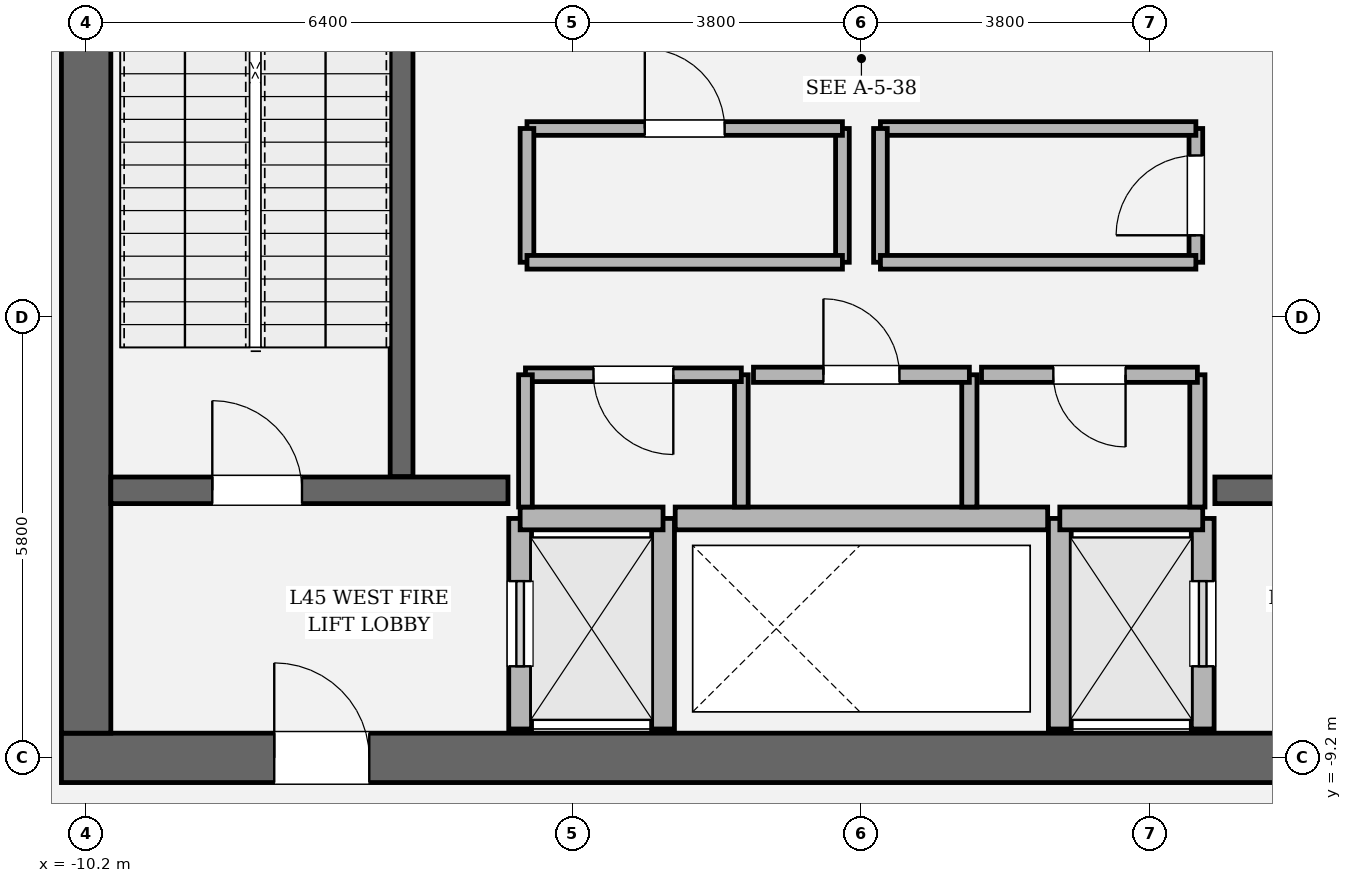
"""IFC4 building model, lengths in metres.
Left out: names, types, materials, properties, quantities, classifications, styles, units other than length and angle.
Written with IfcOpenShell. Run it as: python <this file> out.ifc"""

import sys

from ifc_helpers import new_model, si_unit, direction, frame, frame_2d, origin, place, context, subcontext, project, spatial, rectangle, extrude, element, fill, save


model = new_model("IFC4")
c1 = context("Model", 3, precision=1e-05, world=origin(), true_north=direction((0.0, 1.0)))
c2 = subcontext(c1, "Body", "Model", "MODEL_VIEW")
j1 = project(units=[si_unit("LENGTHUNIT", "METRE"), si_unit("PLANEANGLEUNIT", "RADIAN")], contexts=[c1])
p1 = place(None, origin())
s1 = spatial("IfcSite", under=j1, at=p1, CompositionType="ELEMENT")
p2 = place(p1, origin())
s2 = spatial("IfcBuilding", under=s1, at=p2, CompositionType="ELEMENT")
p3 = place(p2, frame((0.0, 0.0, 192.45)))
s3 = spatial("IfcBuildingStorey", under=s2, at=p3, CompositionType="ELEMENT", Elevation=192.45)
p4 = place(p3, frame((10.525, -9.2, 0.0), z_axis=(0.0, 0.0, 1.0), x_axis=(-1.0, 0.0, 0.0)))
e1 = element("IfcWall", 1, at=p4, inside=s3, PredefinedType="SHEAR", context=c2, shape_type="SweptSolid", body=[
    extrude(rectangle(XDim=21.05, YDim=0.65, at=frame_2d((10.525, 0.0))), origin(), (0.0, 0.0, 1.0), 4.05),
])
p5 = place(p4, frame((2.8, 0.0, 0.0)))
e2 = element("IfcOpeningElement", 2, at=p5, cuts=e1, PredefinedType="OPENING", context=c2, shape_type="SweptSolid", body=[
    extrude(rectangle(XDim=1.25, YDim=2.25, at=frame_2d((0.625, 1.125))), frame((0.0, 0.335, 0.0), z_axis=(0.0, -1.0, 0.0), x_axis=(1.0, 0.0, 0.0)), (0.0, 0.0, 1.0), 0.67),
])
p6 = place(p4, frame((17.0, 0.0, 0.0)))
e3 = element("IfcOpeningElement", 3, at=p6, cuts=e1, PredefinedType="OPENING", context=c2, shape_type="SweptSolid", body=[
    extrude(rectangle(XDim=1.25, YDim=2.25, at=frame_2d((0.625, 1.125))), frame((0.0, 0.335, 0.0), z_axis=(0.0, -1.0, 0.0), x_axis=(1.0, 0.0, 0.0)), (0.0, 0.0, 1.0), 0.67),
])
p7 = place(p3, frame((-10.2, -8.875, 0.0), z_axis=(0.0, 0.0, 1.0), x_axis=(0.0, 1.0, 0.0)))
e4 = element("IfcWall", 4, at=p7, inside=s3, PredefinedType="SHEAR", context=c2, shape_type="SweptSolid", body=[
    extrude(rectangle(XDim=17.75, YDim=0.65, at=frame_2d((8.875, 0.0))), origin(), (0.0, 0.0, 1.0), 4.05),
])
p8 = place(p7, frame((12.665, 0.0, 0.0)))
e5 = element("IfcOpeningElement", 5, at=p8, cuts=e4, PredefinedType="OPENING", context=c2, shape_type="SweptSolid", body=[
    extrude(rectangle(XDim=1.18, YDim=2.2, at=frame_2d((0.59, 1.1))), frame((0.0, 0.335, 0.0), z_axis=(0.0, -1.0, 0.0), x_axis=(1.0, 0.0, 0.0)), (0.0, 0.0, 1.0), 0.67),
])
p9 = place(p3, frame((-6.05, -5.5, 0.0), z_axis=(0.0, 0.0, 1.0), x_axis=(0.0, 1.0, 0.0)))
e6 = element("IfcWall", 6, at=p9, inside=s3, PredefinedType="SOLIDWALL", context=c2, shape_type="SweptSolid", body=[
    extrude(rectangle(XDim=8.95, YDim=0.3, at=frame_2d((4.475, 0.0))), origin(), (0.0, 0.0, 1.0), 4.05),
])
p10 = place(p3, frame((-9.875, -5.68, 0.0), z_axis=(0.0, 0.0, 1.0), x_axis=(1.0, 0.0, 0.0)))
e7 = element("IfcWall", 7, at=p10, inside=s3, PredefinedType="SOLIDWALL", context=c2, shape_type="SweptSolid", body=[
    extrude(rectangle(XDim=5.225, YDim=0.35, at=frame_2d((2.613, 0.0))), origin(), (0.0, 0.0, 1.0), 4.05),
])
p11 = place(p10, frame((1.335, 0.0, 0.0)))
e8 = element("IfcOpeningElement", 8, at=p11, cuts=e7, PredefinedType="OPENING", context=c2, shape_type="SweptSolid", body=[
    extrude(rectangle(XDim=1.18, YDim=2.2, at=frame_2d((0.59, 1.1))), frame((0.0, 0.185, 0.0), z_axis=(0.0, -1.0, 0.0), x_axis=(1.0, 0.0, 0.0)), (0.0, 0.0, 1.0), 0.37),
])
p12 = place(p3, frame((4.65, -5.68, 0.0), z_axis=(0.0, 0.0, 1.0), x_axis=(1.0, 0.0, 0.0)))
e9 = element("IfcWall", 9, at=p12, inside=s3, PredefinedType="SOLIDWALL", context=c2, shape_type="SweptSolid", body=[
    extrude(rectangle(XDim=5.225, YDim=0.35, at=frame_2d((2.613, 0.0))), origin(), (0.0, 0.0, 1.0), 4.05),
])
p13 = place(p12, frame((2.71, 0.0, 0.0)))
e10 = element("IfcOpeningElement", 10, at=p13, cuts=e9, PredefinedType="OPENING", context=c2, shape_type="SweptSolid", body=[
    extrude(rectangle(XDim=1.18, YDim=2.2, at=frame_2d((0.59, 1.1))), frame((0.0, 0.185, 0.0), z_axis=(0.0, -1.0, 0.0), x_axis=(1.0, 0.0, 0.0)), (0.0, 0.0, 1.0), 0.37),
])
p14 = place(p3, frame((-4.49, -8.82, 0.0), z_axis=(0.0, 0.0, 1.0), x_axis=(0.0, 1.0, 0.0)))
e11 = element("IfcWall", 11, at=p14, inside=s3, PredefinedType="SOLIDWALL", context=c2, shape_type="SweptSolid", body=[
    extrude(rectangle(XDim=2.77, YDim=0.3, at=frame_2d((1.385, 0.0))), origin(), (0.0, 0.0, 1.0), 3.83),
])
p15 = place(p14, frame((0.825, 0.0, 0.0)))
e12 = element("IfcOpeningElement", 12, at=p15, cuts=e11, PredefinedType="OPENING", context=c2, shape_type="SweptSolid", body=[
    extrude(rectangle(XDim=1.12, YDim=2.25, at=frame_2d((0.56, 1.125))), frame((0.0, 0.16, 0.0), z_axis=(0.0, -1.0, 0.0), x_axis=(1.0, 0.0, 0.0)), (0.0, 0.0, 1.0), 0.32),
])
p16 = place(p3, frame((-2.61, -8.82, 0.0), z_axis=(0.0, 0.0, 1.0), x_axis=(0.0, 1.0, 0.0)))
e13 = element("IfcWall", 13, at=p16, inside=s3, PredefinedType="SOLIDWALL", context=c2, shape_type="SweptSolid", body=[
    extrude(rectangle(XDim=2.77, YDim=0.3, at=frame_2d((1.385, 0.0))), origin(), (0.0, 0.0, 1.0), 3.83),
])
p17 = place(p3, frame((-4.49, -6.05, 0.0), z_axis=(0.0, 0.0, 1.0), x_axis=(1.0, 0.0, 0.0)))
e14 = element("IfcWall", 14, at=p17, inside=s3, PredefinedType="SOLIDWALL", context=c2, shape_type="SweptSolid", body=[
    extrude(rectangle(XDim=1.88, YDim=0.3, at=frame_2d((0.94, 0.0))), origin(), (0.0, 0.0, 1.0), 3.83),
])
p18 = place(p3, frame((4.49, -8.82, 0.0), z_axis=(0.0, 0.0, 1.0), x_axis=(0.0, 1.0, 0.0)))
e15 = element("IfcWall", 15, at=p18, inside=s3, PredefinedType="SOLIDWALL", context=c2, shape_type="SweptSolid", body=[
    extrude(rectangle(XDim=2.77, YDim=0.3, at=frame_2d((1.385, 0.0))), origin(), (0.0, 0.0, 1.0), 3.83),
])
p19 = place(p18, frame((0.825, 0.0, 0.0)))
e16 = element("IfcOpeningElement", 16, at=p19, cuts=e15, PredefinedType="OPENING", context=c2, shape_type="SweptSolid", body=[
    extrude(rectangle(XDim=1.12, YDim=2.25, at=frame_2d((0.56, 1.125))), frame((0.0, 0.16, 0.0), z_axis=(0.0, -1.0, 0.0), x_axis=(1.0, 0.0, 0.0)), (0.0, 0.0, 1.0), 0.32),
])
p20 = place(p3, frame((2.61, -8.82, 0.0), z_axis=(0.0, 0.0, 1.0), x_axis=(0.0, 1.0, 0.0)))
e17 = element("IfcWall", 17, at=p20, inside=s3, PredefinedType="SOLIDWALL", context=c2, shape_type="SweptSolid", body=[
    extrude(rectangle(XDim=2.77, YDim=0.3, at=frame_2d((1.385, 0.0))), origin(), (0.0, 0.0, 1.0), 3.83),
])
p21 = place(p3, frame((2.61, -6.05, 0.0), z_axis=(0.0, 0.0, 1.0), x_axis=(1.0, 0.0, 0.0)))
e18 = element("IfcWall", 18, at=p21, inside=s3, PredefinedType="SOLIDWALL", context=c2, shape_type="SweptSolid", body=[
    extrude(rectangle(XDim=1.88, YDim=0.3, at=frame_2d((0.94, 0.0))), origin(), (0.0, 0.0, 1.0), 3.83),
])
p22 = place(p3, frame((-2.45, -6.05, 0.0), z_axis=(0.0, 0.0, 1.0), x_axis=(1.0, 0.0, 0.0)))
e19 = element("IfcWall", 19, at=p22, inside=s3, PredefinedType="SOLIDWALL", context=c2, shape_type="SweptSolid", body=[
    extrude(rectangle(XDim=4.9, YDim=0.3, at=frame_2d((2.45, 0.0))), origin(), (0.0, 0.0, 1.0), 3.83),
])
p23 = place(p3, frame((-1.58, -5.9, 0.0), z_axis=(0.0, 0.0, 1.0), x_axis=(0.0, 1.0, 0.0)))
e20 = element("IfcWall", 20, at=p23, inside=s3, PredefinedType="PARTITIONING", context=c2, shape_type="SweptSolid", body=[
    extrude(rectangle(XDim=1.74, YDim=0.18, at=frame_2d((0.87, 0.0))), origin(), (0.0, 0.0, 1.0), 3.83),
])
p24 = place(p3, frame((-1.58, -4.16, 0.0), z_axis=(0.0, 0.0, 1.0), x_axis=(-1.0, 0.0, 0.0)))
e21 = element("IfcWall", 21, at=p24, inside=s3, PredefinedType="PARTITIONING", context=c2, shape_type="SweptSolid", body=[
    extrude(rectangle(XDim=2.84, YDim=0.18, at=frame_2d((1.42, 0.0))), origin(), (0.0, 0.0, 1.0), 3.83),
])
p25 = place(p24, frame((0.895, 0.0, 0.0)))
e22 = element("IfcOpeningElement", 22, at=p25, cuts=e21, PredefinedType="OPENING", context=c2, shape_type="SweptSolid", body=[
    extrude(rectangle(XDim=1.05, YDim=2.2, at=frame_2d((0.525, 1.1))), frame((0.0, 0.1, 0.0), z_axis=(0.0, -1.0, 0.0), x_axis=(1.0, 0.0, 0.0)), (0.0, 0.0, 1.0), 0.2),
])
p26 = place(p3, frame((-4.42, -4.16, 0.0), z_axis=(0.0, 0.0, 1.0), x_axis=(0.0, -1.0, 0.0)))
e23 = element("IfcWall", 23, at=p26, inside=s3, PredefinedType="PARTITIONING", context=c2, shape_type="SweptSolid", body=[
    extrude(rectangle(XDim=1.74, YDim=0.18, at=frame_2d((0.87, 0.0))), origin(), (0.0, 0.0, 1.0), 3.83),
])
p27 = place(p3, frame((1.42, -5.9, 0.0), z_axis=(0.0, 0.0, 1.0), x_axis=(0.0, 1.0, 0.0)))
e24 = element("IfcWall", 24, at=p27, inside=s3, PredefinedType="SOLIDWALL", context=c2, shape_type="SweptSolid", body=[
    extrude(rectangle(XDim=1.74, YDim=0.2, at=frame_2d((0.87, 0.0))), origin(), (0.0, 0.0, 1.0), 3.83),
])
p28 = place(p3, frame((1.42, -4.16, 0.0), z_axis=(0.0, 0.0, 1.0), x_axis=(-1.0, 0.0, 0.0)))
e25 = element("IfcWall", 25, at=p28, inside=s3, PredefinedType="SOLIDWALL", context=c2, shape_type="SweptSolid", body=[
    extrude(rectangle(XDim=2.84, YDim=0.2, at=frame_2d((1.42, 0.0))), origin(), (0.0, 0.0, 1.0), 3.83),
])
p29 = place(p28, frame((0.92, 0.0, 0.0)))
e26 = element("IfcOpeningElement", 26, at=p29, cuts=e25, PredefinedType="OPENING", context=c2, shape_type="SweptSolid", body=[
    extrude(rectangle(XDim=1.0, YDim=2.15, at=frame_2d((0.5, 1.075))), frame((0.0, 0.11, 0.0), z_axis=(0.0, -1.0, 0.0), x_axis=(1.0, 0.0, 0.0)), (0.0, 0.0, 1.0), 0.22),
])
p30 = place(p3, frame((4.42, -5.9, 0.0), z_axis=(0.0, 0.0, 1.0), x_axis=(0.0, 1.0, 0.0)))
e27 = element("IfcWall", 27, at=p30, inside=s3, PredefinedType="SOLIDWALL", context=c2, shape_type="SweptSolid", body=[
    extrude(rectangle(XDim=1.74, YDim=0.2, at=frame_2d((0.87, 0.0))), origin(), (0.0, 0.0, 1.0), 3.83),
])
p31 = place(p3, frame((4.42, -4.16, 0.0), z_axis=(0.0, 0.0, 1.0), x_axis=(-1.0, 0.0, 0.0)))
e28 = element("IfcWall", 28, at=p31, inside=s3, PredefinedType="SOLIDWALL", context=c2, shape_type="SweptSolid", body=[
    extrude(rectangle(XDim=2.84, YDim=0.2, at=frame_2d((1.42, 0.0))), origin(), (0.0, 0.0, 1.0), 3.83),
])
p32 = place(p31, frame((0.945, 0.0, 0.0)))
e29 = element("IfcOpeningElement", 29, at=p32, cuts=e28, PredefinedType="OPENING", context=c2, shape_type="SweptSolid", body=[
    extrude(rectangle(XDim=0.95, YDim=2.15, at=frame_2d((0.475, 1.075))), frame((0.0, 0.11, 0.0), z_axis=(0.0, -1.0, 0.0), x_axis=(1.0, 0.0, 0.0)), (0.0, 0.0, 1.0), 0.22),
])
p33 = place(p3, frame((-0.25, -2.68, 0.0), z_axis=(0.0, 0.0, 1.0), x_axis=(0.0, 1.0, 0.0)))
e30 = element("IfcWall", 30, at=p33, inside=s3, PredefinedType="PARTITIONING", context=c2, shape_type="SweptSolid", body=[
    extrude(rectangle(XDim=1.76, YDim=0.18, at=frame_2d((0.88, 0.0))), origin(), (0.0, 0.0, 1.0), 3.83),
])
p34 = place(p3, frame((-0.25, -0.92, 0.0), z_axis=(0.0, 0.0, 1.0), x_axis=(-1.0, 0.0, 0.0)))
e31 = element("IfcWall", 31, at=p34, inside=s3, PredefinedType="PARTITIONING", context=c2, shape_type="SweptSolid", body=[
    extrude(rectangle(XDim=4.15, YDim=0.18, at=frame_2d((2.075, 0.0))), origin(), (0.0, 0.0, 1.0), 3.83),
])
p35 = place(p34, frame((1.55, 0.0, 0.0)))
e32 = element("IfcOpeningElement", 32, at=p35, cuts=e31, PredefinedType="OPENING", context=c2, shape_type="SweptSolid", body=[
    extrude(rectangle(XDim=1.05, YDim=2.2, at=frame_2d((0.525, 1.1))), frame((0.0, 0.1, 0.0), z_axis=(0.0, -1.0, 0.0), x_axis=(1.0, 0.0, 0.0)), (0.0, 0.0, 1.0), 0.2),
])
p36 = place(p3, frame((-4.4, -0.92, 0.0), z_axis=(0.0, 0.0, 1.0), x_axis=(0.0, -1.0, 0.0)))
e33 = element("IfcWall", 33, at=p36, inside=s3, PredefinedType="PARTITIONING", context=c2, shape_type="SweptSolid", body=[
    extrude(rectangle(XDim=1.76, YDim=0.18, at=frame_2d((0.88, 0.0))), origin(), (0.0, 0.0, 1.0), 3.83),
])
p37 = place(p3, frame((-4.4, -2.68, 0.0), z_axis=(0.0, 0.0, 1.0), x_axis=(1.0, 0.0, 0.0)))
e34 = element("IfcWall", 34, at=p37, inside=s3, PredefinedType="PARTITIONING", context=c2, shape_type="SweptSolid", body=[
    extrude(rectangle(XDim=4.15, YDim=0.18, at=frame_2d((2.075, 0.0))), origin(), (0.0, 0.0, 1.0), 3.83),
])
p38 = place(p3, frame((4.4, -2.68, 0.0), z_axis=(0.0, 0.0, 1.0), x_axis=(0.0, 1.0, 0.0)))
e35 = element("IfcWall", 35, at=p38, inside=s3, PredefinedType="PARTITIONING", context=c2, shape_type="SweptSolid", body=[
    extrude(rectangle(XDim=1.76, YDim=0.18, at=frame_2d((0.88, 0.0))), origin(), (0.0, 0.0, 1.0), 3.83),
])
p39 = place(p38, frame((0.355, 0.0, 0.0)))
e36 = element("IfcOpeningElement", 36, at=p39, cuts=e35, PredefinedType="OPENING", context=c2, shape_type="SweptSolid", body=[
    extrude(rectangle(XDim=1.05, YDim=2.2, at=frame_2d((0.525, 1.1))), frame((0.0, 0.1, 0.0), z_axis=(0.0, -1.0, 0.0), x_axis=(1.0, 0.0, 0.0)), (0.0, 0.0, 1.0), 0.2),
])
p40 = place(p3, frame((4.4, -0.92, 0.0), z_axis=(0.0, 0.0, 1.0), x_axis=(-1.0, 0.0, 0.0)))
e37 = element("IfcWall", 37, at=p40, inside=s3, PredefinedType="PARTITIONING", context=c2, shape_type="SweptSolid", body=[
    extrude(rectangle(XDim=4.15, YDim=0.18, at=frame_2d((2.075, 0.0))), origin(), (0.0, 0.0, 1.0), 3.83),
])
p41 = place(p3, frame((0.25, -0.92, 0.0), z_axis=(0.0, 0.0, 1.0), x_axis=(0.0, -1.0, 0.0)))
e38 = element("IfcWall", 38, at=p41, inside=s3, PredefinedType="PARTITIONING", context=c2, shape_type="SweptSolid", body=[
    extrude(rectangle(XDim=1.76, YDim=0.18, at=frame_2d((0.88, 0.0))), origin(), (0.0, 0.0, 1.0), 3.83),
])
p42 = place(p3, frame((0.25, -2.68, 0.0), z_axis=(0.0, 0.0, 1.0), x_axis=(1.0, 0.0, 0.0)))
e39 = element("IfcWall", 39, at=p42, inside=s3, PredefinedType="PARTITIONING", context=c2, shape_type="SweptSolid", body=[
    extrude(rectangle(XDim=4.15, YDim=0.18, at=frame_2d((2.075, 0.0))), origin(), (0.0, 0.0, 1.0), 3.83),
])
p43 = place(p11, origin())
e40 = element("IfcDoor", 40, at=p43, inside=s3, OperationType="SINGLE_SWING_LEFT", PredefinedType="DOOR", context=c2, shape_type="SweptSolid", body=[
    extrude(rectangle(XDim=1.18, YDim=2.2, at=frame_2d((0.59, 1.1))), frame((0.0, 0.025, 0.0), z_axis=(0.0, -1.0, 0.0), x_axis=(1.0, 0.0, 0.0)), (0.0, 0.0, 1.0), 0.05),
])
fill(e8, e40)
p44 = place(p6, origin())
e41 = element("IfcDoor", 41, at=p44, inside=s3, OperationType="SINGLE_SWING_RIGHT", PredefinedType="DOOR", context=c2, shape_type="SweptSolid", body=[
    extrude(rectangle(XDim=1.25, YDim=2.25, at=frame_2d((0.625, 1.125))), frame((0.0, 0.025, 0.0), z_axis=(0.0, -1.0, 0.0), x_axis=(1.0, 0.0, 0.0)), (0.0, 0.0, 1.0), 0.05),
])
fill(e3, e41)
p45 = place(p15, origin())
e42 = element("IfcDoor", 42, at=p45, inside=s3, OperationType="SLIDING_TO_LEFT", PredefinedType="DOOR", context=c2, shape_type="SweptSolid", body=[
    extrude(rectangle(XDim=1.12, YDim=2.25, at=frame_2d((0.56, 1.125))), frame((0.0, 0.025, 0.0), z_axis=(0.0, -1.0, 0.0), x_axis=(1.0, 0.0, 0.0)), (0.0, 0.0, 1.0), 0.05),
])
fill(e12, e42)
p46 = place(p19, origin())
e43 = element("IfcDoor", 43, at=p46, inside=s3, OperationType="SLIDING_TO_RIGHT", PredefinedType="DOOR", context=c2, shape_type="SweptSolid", body=[
    extrude(rectangle(XDim=1.12, YDim=2.25, at=frame_2d((0.56, 1.125))), frame((0.0, 0.025, 0.0), z_axis=(0.0, -1.0, 0.0), x_axis=(1.0, 0.0, 0.0)), (0.0, 0.0, 1.0), 0.05),
])
fill(e16, e43)
p47 = place(p25, origin())
e44 = element("IfcDoor", 44, at=p47, inside=s3, OperationType="SINGLE_SWING_LEFT", PredefinedType="DOOR", context=c2, shape_type="SweptSolid", body=[
    extrude(rectangle(XDim=1.05, YDim=2.2, at=frame_2d((0.525, 1.1))), frame((0.0, 0.025, 0.0), z_axis=(0.0, -1.0, 0.0), x_axis=(1.0, 0.0, 0.0)), (0.0, 0.0, 1.0), 0.05),
])
fill(e22, e44)
p48 = place(p29, origin())
e45 = element("IfcDoor", 45, at=p48, inside=s3, OperationType="SINGLE_SWING_RIGHT", PredefinedType="DOOR", context=c2, shape_type="SweptSolid", body=[
    extrude(rectangle(XDim=1.0, YDim=2.15, at=frame_2d((0.5, 1.075))), frame((0.0, 0.025, 0.0), z_axis=(0.0, -1.0, 0.0), x_axis=(1.0, 0.0, 0.0)), (0.0, 0.0, 1.0), 0.05),
])
fill(e26, e45)
p49 = place(p32, origin())
e46 = element("IfcDoor", 46, at=p49, inside=s3, OperationType="SINGLE_SWING_LEFT", PredefinedType="DOOR", context=c2, shape_type="SweptSolid", body=[
    extrude(rectangle(XDim=0.95, YDim=2.15, at=frame_2d((0.475, 1.075))), frame((0.0, 0.025, 0.0), z_axis=(0.0, -1.0, 0.0), x_axis=(1.0, 0.0, 0.0)), (0.0, 0.0, 1.0), 0.05),
])
fill(e29, e46)
p50 = place(p35, origin())
e47 = element("IfcDoor", 47, at=p50, inside=s3, OperationType="SINGLE_SWING_RIGHT", PredefinedType="DOOR", context=c2, shape_type="SweptSolid", body=[
    extrude(rectangle(XDim=1.05, YDim=2.2, at=frame_2d((0.525, 1.1))), frame((0.0, 0.025, 0.0), z_axis=(0.0, -1.0, 0.0), x_axis=(1.0, 0.0, 0.0)), (0.0, 0.0, 1.0), 0.05),
])
fill(e32, e47)
p51 = place(p39, origin())
e48 = element("IfcDoor", 48, at=p51, inside=s3, OperationType="SINGLE_SWING_LEFT", PredefinedType="DOOR", context=c2, shape_type="SweptSolid", body=[
    extrude(rectangle(XDim=1.05, YDim=2.2, at=frame_2d((0.525, 1.1))), frame((0.0, 0.025, 0.0), z_axis=(0.0, -1.0, 0.0), x_axis=(1.0, 0.0, 0.0)), (0.0, 0.0, 1.0), 0.05),
])
fill(e36, e48)
save(model, sys.argv[1])
